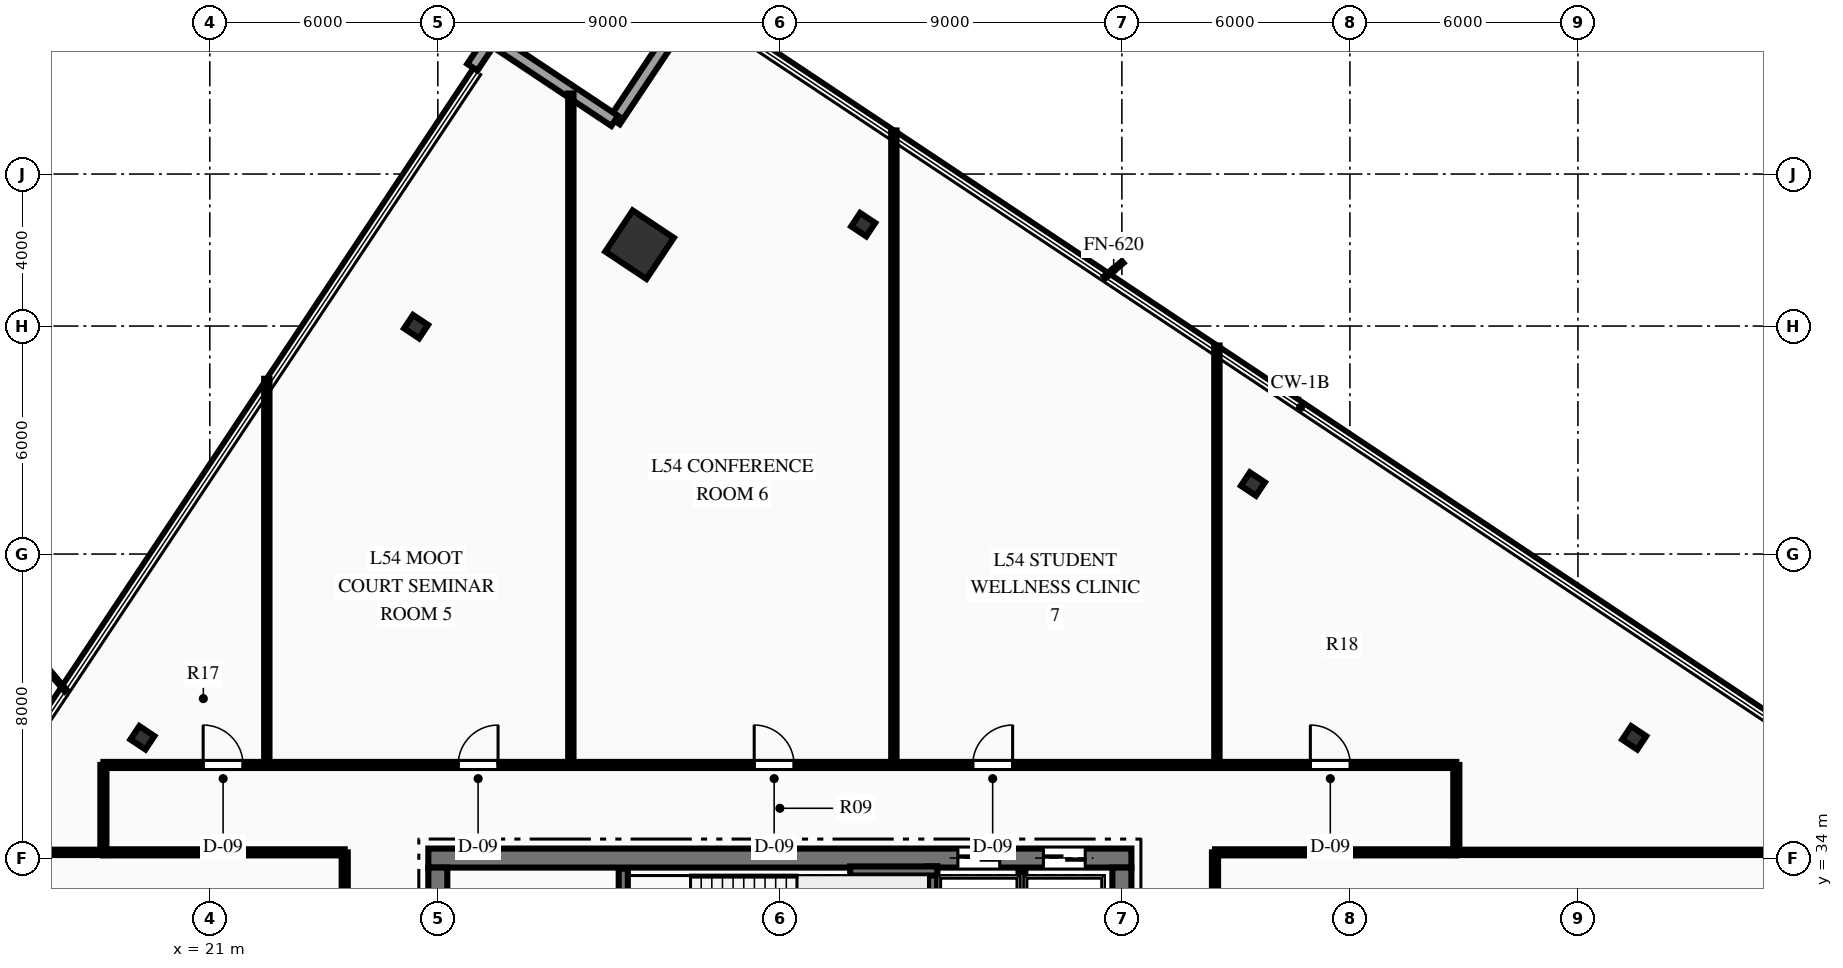
"""IFC4 building model, lengths in metres.
Left out: names, types, materials, properties, quantities, classifications, styles, units other than length and angle.
Written with IfcOpenShell. Run it as: python <this file> out.ifc"""

import sys

from ifc_helpers import new_model, si_unit, direction, frame, frame_2d, origin, origin_2d, place, context, subcontext, project, spatial, rectangle, hollow_rectangle, i_section, extrude, element, fill, save


model = new_model("IFC4")
c1 = context("Model", 3, precision=1e-05, world=origin(), true_north=direction((0.0, 1.0)))
c2 = subcontext(c1, "Body", "Model", "MODEL_VIEW")
j1 = project(units=[si_unit("LENGTHUNIT", "METRE"), si_unit("PLANEANGLEUNIT", "RADIAN")], contexts=[c1])
p1 = place(None, origin())
s1 = spatial("IfcSite", under=j1, at=p1, CompositionType="ELEMENT")
p2 = place(p1, origin())
s2 = spatial("IfcBuilding", under=s1, at=p2, CompositionType="ELEMENT")
p3 = place(p2, frame((0.0, 0.0, 217.2)))
s3 = spatial("IfcBuildingStorey", under=s2, at=p3, CompositionType="ELEMENT", Elevation=217.2)
p4 = place(p3, frame((26.75, 34.0, 0.0), z_axis=(0.0, 0.0, 1.0), x_axis=(1.0, 0.0, 0.0)))
e1 = element("IfcWall", 1, at=p4, inside=s3, PredefinedType="SHEAR", context=c2, shape_type="SweptSolid", body=[
    extrude(rectangle(XDim=18.5, YDim=0.5, at=frame_2d((9.25, 0.0))), origin(), (0.0, 0.0, 1.0), 3.75),
])
p5 = place(p4, frame((13.935, 0.0, 0.0)))
e2 = element("IfcOpeningElement", 2, at=p5, cuts=e1, PredefinedType="OPENING", context=c2, shape_type="SweptSolid", body=[
    extrude(rectangle(XDim=1.1, YDim=2.15, at=frame_2d((0.55, 1.075))), frame((0.0, 0.26, 0.0), z_axis=(0.0, -1.0, 0.0), x_axis=(1.0, 0.0, 0.0)), (0.0, 0.0, 1.0), 0.52),
])
p6 = place(p4, frame((16.185, 0.0, 0.0)))
e3 = element("IfcOpeningElement", 3, at=p6, cuts=e1, PredefinedType="OPENING", context=c2, shape_type="SweptSolid", body=[
    extrude(rectangle(XDim=1.1, YDim=2.15, at=frame_2d((0.55, 1.075))), frame((0.0, 0.26, 0.0), z_axis=(0.0, -1.0, 0.0), x_axis=(1.0, 0.0, 0.0)), (0.0, 0.0, 1.0), 0.52),
])
p7 = place(p3, frame((27.0, 18.25, 0.0), z_axis=(0.0, 0.0, 1.0), x_axis=(0.0, 1.0, 0.0)))
e4 = element("IfcWall", 4, at=p7, inside=s3, PredefinedType="SHEAR", context=c2, shape_type="SweptSolid", body=[
    extrude(rectangle(XDim=15.5, YDim=0.5, at=frame_2d((7.75, 0.0))), origin(), (0.0, 0.0, 1.0), 3.75),
])
p8 = place(p7, frame((9.99, 0.0, 0.0)))
e5 = element("IfcOpeningElement", 5, at=p8, cuts=e4, PredefinedType="OPENING", context=c2, shape_type="SweptSolid", body=[
    extrude(rectangle(XDim=1.4, YDim=2.2, at=frame_2d((0.7, 1.1))), frame((0.0, 0.26, 0.0), z_axis=(0.0, -1.0, 0.0), x_axis=(1.0, 0.0, 0.0)), (0.0, 0.0, 1.0), 0.52),
])
p9 = place(p3, frame((45.0, 18.25, 0.0), z_axis=(0.0, 0.0, 1.0), x_axis=(0.0, 1.0, 0.0)))
e6 = element("IfcWall", 6, at=p9, inside=s3, PredefinedType="SHEAR", context=c2, shape_type="SweptSolid", body=[
    extrude(rectangle(XDim=15.5, YDim=0.5, at=frame_2d((7.75, 0.0))), origin(), (0.0, 0.0, 1.0), 3.75),
])
p10 = place(p9, frame((9.99, 0.0, 0.0)))
e7 = element("IfcOpeningElement", 7, at=p10, cuts=e6, PredefinedType="OPENING", context=c2, shape_type="SweptSolid", body=[
    extrude(rectangle(XDim=1.4, YDim=2.2, at=frame_2d((0.7, 1.1))), frame((0.0, 0.26, 0.0), z_axis=(0.0, -1.0, 0.0), x_axis=(1.0, 0.0, 0.0)), (0.0, 0.0, 1.0), 0.52),
])
p11 = place(p3, frame((31.88, 29.93, 0.0), z_axis=(0.0, 0.0, 1.0), x_axis=(0.0, 1.0, 0.0)))
e8 = element("IfcWall", 8, at=p11, inside=s3, PredefinedType="SHEAR", context=c2, shape_type="SweptSolid", body=[
    extrude(rectangle(XDim=3.79, YDim=0.24, at=frame_2d((1.895, 0.0))), origin(), (0.0, 0.0, 1.0), 3.75),
])
p12 = place(p3, frame((40.02, 29.93, 0.0), z_axis=(0.0, 0.0, 1.0), x_axis=(0.0, 1.0, 0.0)))
e9 = element("IfcWall", 9, at=p12, inside=s3, PredefinedType="SHEAR", context=c2, shape_type="SweptSolid", body=[
    extrude(rectangle(XDim=3.85, YDim=0.24, at=frame_2d((1.925, 0.0))), origin(), (0.0, 0.0, 1.0), 3.75),
])
p13 = place(p3, frame((37.85, 33.66, 0.0), z_axis=(0.0, 0.0, 1.0), x_axis=(1.0, 0.0, 0.0)))
e10 = element("IfcWall", 10, at=p13, inside=s3, PredefinedType="SHEAR", context=c2, shape_type="SweptSolid", body=[
    extrude(rectangle(XDim=2.29, YDim=0.24, at=frame_2d((1.145, 0.0))), origin(), (0.0, 0.0, 1.0), 3.75),
])
p14 = place(p3, frame((32.308, 50.141, 0.0), z_axis=(0.0, 0.0, 1.0), x_axis=(0.554118199338, 0.832437998389, 0.0)))
e11 = element("IfcColumn", 11, at=p14, inside=s3, PredefinedType="COLUMN", context=c2, shape_type="SweptSolid", body=[
    extrude(hollow_rectangle(XDim=1.3, YDim=1.3, WallThickness=0.06, at=origin_2d()), origin(), (0.0, 0.0, 1.0), 3.75),
])
for number, where, z_axis, x_axis in (
    (12, (58.481, 37.164, 0.0), (0.0, 0.0, 1.0), (0.554, 0.832, 0.0)),
    (13, (48.448, 43.842, 0.0), (0.0, 0.0, 1.0), (0.554, 0.832, 0.0)),
    (14, (38.193, 50.668, 0.0), (0.0, 0.0, 1.0), (0.554, 0.832, 0.0)),
    (15, (26.428, 47.984, 0.0), (0.0, 0.0, 1.0), (0.554, 0.832, 0.0)),
    (16, (19.226, 37.166, 0.0), (0.0, 0.0, 1.0), (0.554, 0.832, 0.0)),
):
    element("IfcColumn", number, at=place(p3, frame(where, z_axis=z_axis, x_axis=x_axis)), inside=s3, PredefinedType="COLUMN", context=c2, shape_type="SweptSolid", body=[
        extrude(i_section(OverallWidth=0.424, OverallDepth=0.474, WebThickness=0.048, FlangeThickness=0.077, at=origin_2d()), origin(), (0.0, 0.0, 1.0), 3.75),
    ])
p15 = place(p3, frame((31.654, 53.399, 0.0), z_axis=(0.0, 0.0, 1.0), x_axis=(0.554078850013, 0.832464190202, 0.0)))
e17 = element("IfcWall", 17, at=p15, inside=s3, PredefinedType="STANDARD", context=c2, shape_type="SweptSolid", body=[
    extrude(rectangle(XDim=3.9, YDim=0.32, at=frame_2d((1.95, 0.0))), origin(), (0.0, 0.0, 1.0), 3.47),
])
p16 = place(p3, frame((28.408, 55.56, 0.0), z_axis=(0.0, 0.0, 1.0), x_axis=(0.832435315447, -0.554122229834, 0.0)))
e18 = element("IfcWall", 18, at=p16, inside=s3, PredefinedType="STANDARD", context=c2, shape_type="SweptSolid", body=[
    extrude(rectangle(XDim=3.9, YDim=0.32, at=frame_2d((1.95, 0.0))), origin(), (0.0, 0.0, 1.0), 3.47),
])
p17 = place(p3, frame((27.909, 54.811, 0.0), z_axis=(0.0, 0.0, 1.0), x_axis=(0.554136731172, 0.832425662246, 0.0)))
e19 = element("IfcWall", 19, at=p17, inside=s3, PredefinedType="STANDARD", context=c2, shape_type="SweptSolid", body=[
    extrude(rectangle(XDim=0.9, YDim=0.32, at=frame_2d((0.45, 0.0))), origin(), (0.0, 0.0, 1.0), 3.47),
])
p18 = place(p3, frame((42.37, 29.9, 0.0), z_axis=(0.0, 0.0, 1.0), x_axis=(0.0, 1.0, 0.0)))
e20 = element("IfcWall", 20, at=p18, inside=s3, PredefinedType="PARTITIONING", context=c2, shape_type="SweptSolid", body=[
    extrude(rectangle(XDim=3.75, YDim=0.18, at=frame_2d((1.875, 0.0))), origin(), (0.0, 0.0, 1.0), 3.47),
])
p19 = place(p3, frame((18.2, 36.45, 0.0), z_axis=(0.0, 0.0, 1.0), x_axis=(1.0, 0.0, 0.0)))
e21 = element("IfcWall", 21, at=p19, inside=s3, PredefinedType="PARTITIONING", context=c2, shape_type="SweptSolid", body=[
    extrude(rectangle(XDim=35.6, YDim=0.16, at=frame_2d((17.8, 0.0))), origin(), (0.0, 0.0, 1.0), 2.849),
])
p20 = place(p19, frame((2.625, 0.0, 0.0)))
e22 = element("IfcOpeningElement", 22, at=p20, cuts=e21, PredefinedType="OPENING", context=c2, shape_type="SweptSolid", body=[
    extrude(rectangle(XDim=1.05, YDim=2.15, at=frame_2d((0.525, 1.075))), frame((0.0, 0.09, 0.0), z_axis=(0.0, -1.0, 0.0), x_axis=(1.0, 0.0, 0.0)), (0.0, 0.0, 1.0), 0.18),
])
p21 = place(p19, frame((9.335, 0.0, 0.0)))
e23 = element("IfcOpeningElement", 23, at=p21, cuts=e21, PredefinedType="OPENING", context=c2, shape_type="SweptSolid", body=[
    extrude(rectangle(XDim=1.05, YDim=2.15, at=frame_2d((0.525, 1.075))), frame((0.0, 0.09, 0.0), z_axis=(0.0, -1.0, 0.0), x_axis=(1.0, 0.0, 0.0)), (0.0, 0.0, 1.0), 0.18),
])
p22 = place(p19, frame((17.125, 0.0, 0.0)))
e24 = element("IfcOpeningElement", 24, at=p22, cuts=e21, PredefinedType="OPENING", context=c2, shape_type="SweptSolid", body=[
    extrude(rectangle(XDim=1.05, YDim=2.15, at=frame_2d((0.525, 1.075))), frame((0.0, 0.09, 0.0), z_axis=(0.0, -1.0, 0.0), x_axis=(1.0, 0.0, 0.0)), (0.0, 0.0, 1.0), 0.18),
])
p23 = place(p19, frame((22.875, 0.0, 0.0)))
e25 = element("IfcOpeningElement", 25, at=p23, cuts=e21, PredefinedType="OPENING", context=c2, shape_type="SweptSolid", body=[
    extrude(rectangle(XDim=1.05, YDim=2.15, at=frame_2d((0.525, 1.075))), frame((0.0, 0.09, 0.0), z_axis=(0.0, -1.0, 0.0), x_axis=(1.0, 0.0, 0.0)), (0.0, 0.0, 1.0), 0.18),
])
p24 = place(p19, frame((31.759, 0.0, 0.0)))
e26 = element("IfcOpeningElement", 26, at=p24, cuts=e21, PredefinedType="OPENING", context=c2, shape_type="SweptSolid", body=[
    extrude(rectangle(XDim=1.05, YDim=2.15, at=frame_2d((0.525, 1.075))), frame((0.0, 0.09, 0.0), z_axis=(0.0, -1.0, 0.0), x_axis=(1.0, 0.0, 0.0)), (0.0, 0.0, 1.0), 0.18),
])
for number, where, z_axis, x_axis in (
    (27, (18.2, 34.15, 0.0), (0.0, 0.0, 1.0), (1.0, 0.0, 0.0)),
    (28, (47.45, 34.15, 0.0), (0.0, 0.0, 1.0), (1.0, 0.0, 0.0)),
):
    element("IfcWall", number, at=place(p3, frame(where, z_axis=z_axis, x_axis=x_axis)), inside=s3, PredefinedType="PARTITIONING", context=c2, shape_type="SweptSolid", body=[
        extrude(rectangle(XDim=6.35, YDim=0.16, at=frame_2d((3.175, 0.0))), origin(), (0.0, 0.0, 1.0), 3.47),
    ])
p25 = place(p3, frame((24.55, 17.85, 0.0), z_axis=(0.0, 0.0, 1.0), x_axis=(0.0, 1.0, 0.0)))
e29 = element("IfcWall", 29, at=p25, inside=s3, PredefinedType="PARTITIONING", context=c2, shape_type="SweptSolid", body=[
    extrude(rectangle(XDim=16.3, YDim=0.16, at=frame_2d((8.15, 0.0))), origin(), (0.0, 0.0, 1.0), 3.47),
])
p26 = place(p25, frame((2.775, 0.0, 0.0)))
e30 = element("IfcOpeningElement", 30, at=p26, cuts=e29, PredefinedType="OPENING", context=c2, shape_type="SweptSolid", body=[
    extrude(rectangle(XDim=0.95, YDim=2.15, at=frame_2d((0.475, 1.075))), frame((0.0, 0.09, 0.0), z_axis=(0.0, -1.0, 0.0), x_axis=(1.0, 0.0, 0.0)), (0.0, 0.0, 1.0), 0.18),
])
p27 = place(p25, frame((8.729, 0.0, 0.0)))
e31 = element("IfcOpeningElement", 31, at=p27, cuts=e29, PredefinedType="OPENING", context=c2, shape_type="SweptSolid", body=[
    extrude(rectangle(XDim=1.05, YDim=2.15, at=frame_2d((0.525, 1.075))), frame((0.0, 0.09, 0.0), z_axis=(0.0, -1.0, 0.0), x_axis=(1.0, 0.0, 0.0)), (0.0, 0.0, 1.0), 0.18),
])
p28 = place(p3, frame((47.45, 27.25, 0.0), z_axis=(0.0, 0.0, 1.0), x_axis=(0.0, 1.0, 0.0)))
e32 = element("IfcWall", 32, at=p28, inside=s3, PredefinedType="PARTITIONING", context=c2, shape_type="SweptSolid", body=[
    extrude(rectangle(XDim=6.9, YDim=0.16, at=frame_2d((3.45, 0.0))), origin(), (0.0, 0.0, 1.0), 3.47),
])
for number, where, z_axis, x_axis in (
    (33, (18.2, 34.15, 0.0), (0.0, 0.0, 1.0), (0.0, 1.0, 0.0)),
    (34, (53.8, 34.15, 0.0), (0.0, 0.0, 1.0), (0.0, 1.0, 0.0)),
):
    element("IfcWall", number, at=place(p3, frame(where, z_axis=z_axis, x_axis=x_axis)), inside=s3, PredefinedType="PARTITIONING", context=c2, shape_type="SweptSolid", body=[
        extrude(rectangle(XDim=2.3, YDim=0.16, at=frame_2d((1.15, 0.0))), origin(), (0.0, 0.0, 1.0), 3.47),
    ])
p29 = place(p3, frame((14.204, 34.15, 0.0), z_axis=(0.0, 0.0, 1.0), x_axis=(1.0, 0.0, 0.0)))
e35 = element("IfcWall", 35, at=p29, inside=s3, PredefinedType="PARTITIONING", context=c2, shape_type="SweptSolid", body=[
    extrude(rectangle(XDim=3.996, YDim=0.14, at=frame_2d((1.998, 0.0))), origin(), (0.0, 0.0, 1.0), 3.47),
])
p30 = place(p3, frame((53.8, 34.15, 0.0), z_axis=(0.0, 0.0, 1.0), x_axis=(1.0, 0.0, 0.0)))
e36 = element("IfcWall", 36, at=p30, inside=s3, PredefinedType="PARTITIONING", context=c2, shape_type="SweptSolid", body=[
    extrude(rectangle(XDim=11.122, YDim=0.14, at=frame_2d((5.561, 0.0))), origin(), (0.0, 0.0, 1.0), 3.47),
])
p31 = place(p3, frame((22.5, 36.45, 0.0), z_axis=(0.0, 0.0, 1.0), x_axis=(0.0, 1.0, 0.0)))
e37 = element("IfcWall", 37, at=p31, inside=s3, PredefinedType="PARTITIONING", context=c2, shape_type="SweptSolid", body=[
    extrude(rectangle(XDim=10.163, YDim=0.14, at=frame_2d((5.082, 0.0))), origin(), (0.0, 0.0, 1.0), 3.47),
])
p32 = place(p3, frame((30.5, 36.45, 0.0), z_axis=(0.0, 0.0, 1.0), x_axis=(0.0, 1.0, 0.0)))
e38 = element("IfcWall", 38, at=p32, inside=s3, PredefinedType="PARTITIONING", context=c2, shape_type="SweptSolid", body=[
    extrude(rectangle(XDim=17.669, YDim=0.14, at=frame_2d((8.835, 0.0))), origin(), (0.0, 0.0, 1.0), 3.47),
])
p33 = place(p3, frame((39.0, 36.45, 0.0), z_axis=(0.0, 0.0, 1.0), x_axis=(0.0, 1.0, 0.0)))
e39 = element("IfcWall", 39, at=p33, inside=s3, PredefinedType="PARTITIONING", context=c2, shape_type="SweptSolid", body=[
    extrude(rectangle(XDim=16.696, YDim=0.14, at=frame_2d((8.348, 0.0))), origin(), (0.0, 0.0, 1.0), 3.47),
])
p34 = place(p3, frame((47.5, 36.45, 0.0), z_axis=(0.0, 0.0, 1.0), x_axis=(0.0, 1.0, 0.0)))
e40 = element("IfcWall", 40, at=p34, inside=s3, PredefinedType="PARTITIONING", context=c2, shape_type="SweptSolid", body=[
    extrude(rectangle(XDim=11.038, YDim=0.14, at=frame_2d((5.519, 0.0))), origin(), (0.0, 0.0, 1.0), 2.849),
])
p35 = place(p20, origin())
e41 = element("IfcDoor", 41, at=p35, inside=s3, OperationType="SINGLE_SWING_LEFT", PredefinedType="DOOR", context=c2, shape_type="SweptSolid", body=[
    extrude(rectangle(XDim=1.05, YDim=2.15, at=frame_2d((0.525, 1.075))), frame((0.0, 0.025, 0.0), z_axis=(0.0, -1.0, 0.0), x_axis=(1.0, 0.0, 0.0)), (0.0, 0.0, 1.0), 0.05),
])
fill(e22, e41)
p36 = place(p21, origin())
e42 = element("IfcDoor", 42, at=p36, inside=s3, OperationType="SINGLE_SWING_RIGHT", PredefinedType="DOOR", context=c2, shape_type="SweptSolid", body=[
    extrude(rectangle(XDim=1.05, YDim=2.15, at=frame_2d((0.525, 1.075))), frame((0.0, 0.025, 0.0), z_axis=(0.0, -1.0, 0.0), x_axis=(1.0, 0.0, 0.0)), (0.0, 0.0, 1.0), 0.05),
])
fill(e23, e42)
p37 = place(p22, origin())
e43 = element("IfcDoor", 43, at=p37, inside=s3, OperationType="SINGLE_SWING_LEFT", PredefinedType="DOOR", context=c2, shape_type="SweptSolid", body=[
    extrude(rectangle(XDim=1.05, YDim=2.15, at=frame_2d((0.525, 1.075))), frame((0.0, 0.025, 0.0), z_axis=(0.0, -1.0, 0.0), x_axis=(1.0, 0.0, 0.0)), (0.0, 0.0, 1.0), 0.05),
])
fill(e24, e43)
p38 = place(p23, origin())
e44 = element("IfcDoor", 44, at=p38, inside=s3, OperationType="SINGLE_SWING_RIGHT", PredefinedType="DOOR", context=c2, shape_type="SweptSolid", body=[
    extrude(rectangle(XDim=1.05, YDim=2.15, at=frame_2d((0.525, 1.075))), frame((0.0, 0.025, 0.0), z_axis=(0.0, -1.0, 0.0), x_axis=(1.0, 0.0, 0.0)), (0.0, 0.0, 1.0), 0.05),
])
fill(e25, e44)
p39 = place(p24, origin())
e45 = element("IfcDoor", 45, at=p39, inside=s3, OperationType="SINGLE_SWING_LEFT", PredefinedType="DOOR", context=c2, shape_type="SweptSolid", body=[
    extrude(rectangle(XDim=1.05, YDim=2.15, at=frame_2d((0.525, 1.075))), frame((0.0, 0.025, 0.0), z_axis=(0.0, -1.0, 0.0), x_axis=(1.0, 0.0, 0.0)), (0.0, 0.0, 1.0), 0.05),
])
fill(e26, e45)
p40 = place(p5, origin())
e46 = element("IfcDoor", 46, at=p40, inside=s3, OperationType="SLIDING_TO_LEFT", PredefinedType="DOOR", context=c2, shape_type="SweptSolid", body=[
    extrude(rectangle(XDim=1.1, YDim=2.15, at=frame_2d((0.55, 1.075))), frame((0.0, 0.025, 0.0), z_axis=(0.0, -1.0, 0.0), x_axis=(1.0, 0.0, 0.0)), (0.0, 0.0, 1.0), 0.05),
])
fill(e2, e46)
p41 = place(p6, origin())
e47 = element("IfcDoor", 47, at=p41, inside=s3, OperationType="SLIDING_TO_LEFT", PredefinedType="DOOR", context=c2, shape_type="SweptSolid", body=[
    extrude(rectangle(XDim=1.1, YDim=2.15, at=frame_2d((0.55, 1.075))), frame((0.0, 0.025, 0.0), z_axis=(0.0, -1.0, 0.0), x_axis=(1.0, 0.0, 0.0)), (0.0, 0.0, 1.0), 0.05),
])
fill(e3, e47)
save(model, sys.argv[1])
